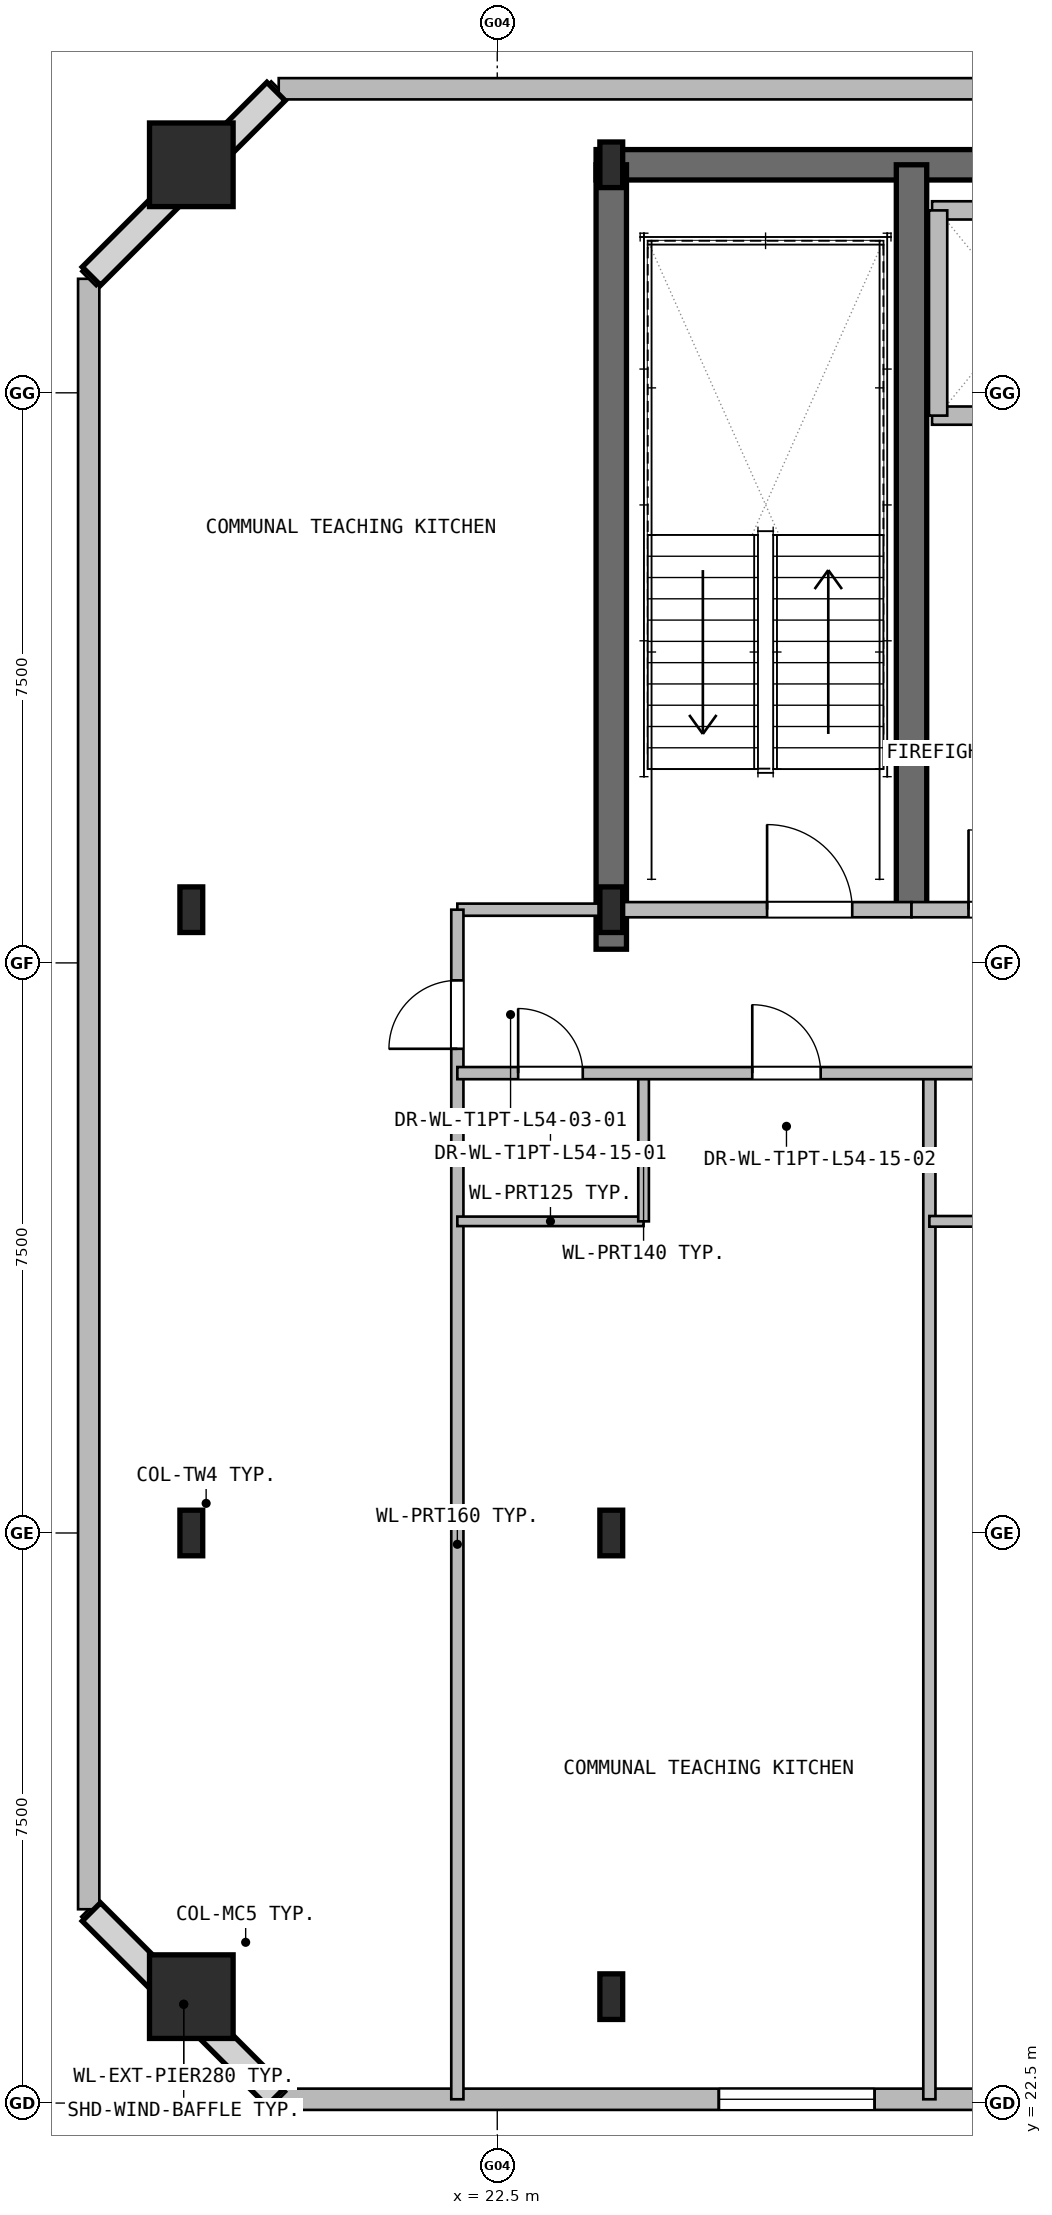
"""IFC4 building model, lengths in metres.
Left out: names, types, materials, properties, quantities, classifications, styles, units other than length and angle.
Written with IfcOpenShell. Run it as: python <this file> out.ifc"""

import sys

from ifc_helpers import new_model, si_unit, direction, frame, frame_2d, origin, origin_2d, place, context, subcontext, project, spatial, rectangle, hollow_rectangle, i_section, extrude, element, fill, save


model = new_model("IFC4")
c1 = context("Model", 3, precision=1e-05, world=origin(), true_north=direction((0.0, 1.0)))
c2 = subcontext(c1, "Body", "Model", "MODEL_VIEW")
j1 = project(units=[si_unit("LENGTHUNIT", "METRE"), si_unit("PLANEANGLEUNIT", "RADIAN")], contexts=[c1])
p1 = place(None, origin())
s1 = spatial("IfcSite", under=j1, at=p1, CompositionType="ELEMENT")
p2 = place(p1, origin())
s2 = spatial("IfcBuilding", under=s1, at=p2, CompositionType="ELEMENT")
p3 = place(p2, frame((0.0, 0.0, 197.1)))
s3 = spatial("IfcBuildingStorey", under=s2, at=p3, CompositionType="ELEMENT", Elevation=197.1)
p4 = place(p3, frame((23.8, 48.0, 0.0), z_axis=(0.0, 0.0, 1.0), x_axis=(1.0, 0.0, 0.0)))
e1 = element("IfcWall", 1, at=p4, inside=s3, PredefinedType="SHEAR", context=c2, shape_type="SweptSolid", body=[
    extrude(rectangle(XDim=27.4, YDim=0.4, at=frame_2d((13.7, 0.0))), origin(), (0.0, 0.0, 1.0), 4.2),
])
p5 = place(p3, frame((24.0, 37.68, 0.0), z_axis=(0.0, 0.0, 1.0), x_axis=(0.0, 1.0, 0.0)))
e2 = element("IfcWall", 2, at=p5, inside=s3, PredefinedType="SHEAR", context=c2, shape_type="SweptSolid", body=[
    extrude(rectangle(XDim=10.32, YDim=0.4, at=frame_2d((5.16, 0.0))), origin(), (0.0, 0.0, 1.0), 4.2),
])
p6 = place(p3, frame((27.95, 38.2, 0.0), z_axis=(0.0, 0.0, 1.0), x_axis=(0.0, 1.0, 0.0)))
e3 = element("IfcWall", 3, at=p6, inside=s3, PredefinedType="SHEAR", context=c2, shape_type="SweptSolid", body=[
    extrude(rectangle(XDim=9.8, YDim=0.4, at=frame_2d((4.9, 0.0))), origin(), (0.0, 0.0, 1.0), 4.2),
])
p7 = place(p3, frame((18.475, 23.9, 0.0), z_axis=(0.0, 0.0, 1.0), x_axis=(1.0, 0.0, 0.0)))
e4 = element("IfcColumn", 4, at=p7, inside=s3, PredefinedType="COLUMN", context=c2, shape_type="SweptSolid", body=[
    extrude(hollow_rectangle(XDim=1.1, YDim=1.1, WallThickness=0.032, at=origin_2d()), origin(), (0.0, 0.0, 1.0), 4.2),
])
for number, where, z_axis, x_axis in (
    (5, (18.475, 30.0, 0.0), (0.0, 0.0, 1.0), (1.0, 0.0, 0.0)),
    (6, (18.475, 38.2, 0.0), (0.0, 0.0, 1.0), (1.0, 0.0, 0.0)),
):
    element("IfcColumn", number, at=place(p3, frame(where, z_axis=z_axis, x_axis=x_axis)), inside=s3, PredefinedType="COLUMN", context=c2, shape_type="SweptSolid", body=[
        extrude(i_section(OverallWidth=0.3, OverallDepth=0.6, WebThickness=0.014, FlangeThickness=0.025, at=origin_2d()), origin(), (0.0, 0.0, 1.0), 4.2),
    ])
p8 = place(p3, frame((18.475, 48.0, 0.0), z_axis=(0.0, 0.0, 1.0), x_axis=(1.0, 0.0, 0.0)))
e7 = element("IfcColumn", 7, at=p8, inside=s3, PredefinedType="COLUMN", context=c2, shape_type="SweptSolid", body=[
    extrude(hollow_rectangle(XDim=1.1, YDim=1.1, WallThickness=0.032, at=origin_2d()), origin(), (0.0, 0.0, 1.0), 4.2),
])
for number, where, z_axis, x_axis in (
    (8, (24.0, 23.9, 0.0), (0.0, 0.0, 1.0), (1.0, 0.0, 0.0)),
    (9, (24.0, 30.0, 0.0), (0.0, 0.0, 1.0), (1.0, 0.0, 0.0)),
    (10, (24.0, 38.2, 0.0), (0.0, 0.0, 1.0), (1.0, 0.0, 0.0)),
    (11, (24.0, 48.0, 0.0), (0.0, 0.0, 1.0), (1.0, 0.0, 0.0)),
):
    element("IfcColumn", number, at=place(p3, frame(where, z_axis=z_axis, x_axis=x_axis)), inside=s3, PredefinedType="COLUMN", context=c2, shape_type="SweptSolid", body=[
        extrude(i_section(OverallWidth=0.3, OverallDepth=0.6, WebThickness=0.014, FlangeThickness=0.025, at=origin_2d()), origin(), (0.0, 0.0, 1.0), 4.2),
    ])
p9 = place(p3, frame((55.375, 22.55, 0.0), z_axis=(0.0, 0.0, 1.0), x_axis=(-1.0, 0.0, 0.0)))
e12 = element("IfcWall", 12, at=p9, inside=s3, PredefinedType="SOLIDWALL", context=c2, shape_type="SweptSolid", body=[
    extrude(rectangle(XDim=35.75, YDim=0.28, at=frame_2d((17.875, 0.0))), origin(), (0.0, 0.0, 1.0), 3.88),
])
p10 = place(p9, frame((27.91, 0.0, 0.8)))
e13 = element("IfcOpeningElement", 13, at=p10, cuts=e12, PredefinedType="OPENING", context=c2, shape_type="SweptSolid", body=[
    extrude(rectangle(XDim=2.05, YDim=1.9, at=frame_2d((1.025, 0.95))), frame((0.0, 0.15, 0.0), z_axis=(0.0, -1.0, 0.0), x_axis=(1.0, 0.0, 0.0)), (0.0, 0.0, 1.0), 0.3),
])
p11 = place(p9, frame((23.06, 0.0, 0.8)))
e14 = element("IfcOpeningElement", 14, at=p11, cuts=e12, PredefinedType="OPENING", context=c2, shape_type="SweptSolid", body=[
    extrude(rectangle(XDim=2.05, YDim=1.9, at=frame_2d((1.025, 0.95))), frame((0.0, 0.15, 0.0), z_axis=(0.0, -1.0, 0.0), x_axis=(1.0, 0.0, 0.0)), (0.0, 0.0, 1.0), 0.3),
])
p12 = place(p9, frame((16.85, 0.0, 0.8)))
e15 = element("IfcOpeningElement", 15, at=p12, cuts=e12, PredefinedType="OPENING", context=c2, shape_type="SweptSolid", body=[
    extrude(rectangle(XDim=2.05, YDim=1.9, at=frame_2d((1.025, 0.95))), frame((0.0, 0.15, 0.0), z_axis=(0.0, -1.0, 0.0), x_axis=(1.0, 0.0, 0.0)), (0.0, 0.0, 1.0), 0.3),
])
p13 = place(p9, frame((10.64, 0.0, 0.8)))
e16 = element("IfcOpeningElement", 16, at=p13, cuts=e12, PredefinedType="OPENING", context=c2, shape_type="SweptSolid", body=[
    extrude(rectangle(XDim=2.05, YDim=1.9, at=frame_2d((1.025, 0.95))), frame((0.0, 0.15, 0.0), z_axis=(0.0, -1.0, 0.0), x_axis=(1.0, 0.0, 0.0)), (0.0, 0.0, 1.0), 0.3),
])
p14 = place(p9, frame((5.79, 0.0, 0.8)))
e17 = element("IfcOpeningElement", 17, at=p14, cuts=e12, PredefinedType="OPENING", context=c2, shape_type="SweptSolid", body=[
    extrude(rectangle(XDim=2.05, YDim=1.9, at=frame_2d((1.025, 0.95))), frame((0.0, 0.15, 0.0), z_axis=(0.0, -1.0, 0.0), x_axis=(1.0, 0.0, 0.0)), (0.0, 0.0, 1.0), 0.3),
])
p15 = place(p3, frame((19.625, 22.55, 0.0), z_axis=(0.0, 0.0, 1.0), x_axis=(-0.707106781187, 0.707106781187, 0.0)))
e18 = element("IfcWall", 18, at=p15, inside=s3, PredefinedType="SOLIDWALL", context=c2, shape_type="SweptSolid", body=[
    extrude(rectangle(XDim=3.536, YDim=0.28, at=frame_2d((1.768, 0.0))), origin(), (0.0, 0.0, 1.0), 3.88),
])
p16 = place(p3, frame((17.125, 25.05, 0.0), z_axis=(0.0, 0.0, 1.0), x_axis=(0.0, 1.0, 0.0)))
e19 = element("IfcWall", 19, at=p16, inside=s3, PredefinedType="SOLIDWALL", context=c2, shape_type="SweptSolid", body=[
    extrude(rectangle(XDim=21.45, YDim=0.28, at=frame_2d((10.725, 0.0))), origin(), (0.0, 0.0, 1.0), 3.88),
])
p17 = place(p3, frame((17.125, 46.5, 0.0), z_axis=(0.0, 0.0, 1.0), x_axis=(0.707106781187, 0.707106781187, 0.0)))
e20 = element("IfcWall", 20, at=p17, inside=s3, PredefinedType="SOLIDWALL", context=c2, shape_type="SweptSolid", body=[
    extrude(rectangle(XDim=3.536, YDim=0.28, at=frame_2d((1.768, 0.0))), origin(), (0.0, 0.0, 1.0), 3.88),
])
p18 = place(p3, frame((19.625, 49.0, 0.0), z_axis=(0.0, 0.0, 1.0), x_axis=(1.0, 0.0, 0.0)))
e21 = element("IfcWall", 21, at=p18, inside=s3, PredefinedType="SOLIDWALL", context=c2, shape_type="SweptSolid", body=[
    extrude(rectangle(XDim=35.75, YDim=0.28, at=frame_2d((17.875, 0.0))), origin(), (0.0, 0.0, 1.0), 3.88),
])
p19 = place(p3, frame((24.0, 38.2, 0.0), z_axis=(0.0, 0.0, 1.0), x_axis=(1.0, 0.0, 0.0)))
e22 = element("IfcWall", 22, at=p19, inside=s3, PredefinedType="PARTITIONING", context=c2, shape_type="SweptSolid", body=[
    extrude(rectangle(XDim=3.95, YDim=0.2, at=frame_2d((1.975, 0.0))), origin(), (0.0, 0.0, 1.0), 3.28),
])
p20 = place(p19, frame((2.05, 0.0, 0.0)))
e23 = element("IfcOpeningElement", 23, at=p20, cuts=e22, PredefinedType="OPENING", context=c2, shape_type="SweptSolid", body=[
    extrude(rectangle(XDim=1.12, YDim=2.1, at=frame_2d((0.56, 1.05))), frame((0.0, 0.11, 0.0), z_axis=(0.0, -1.0, 0.0), x_axis=(1.0, 0.0, 0.0)), (0.0, 0.0, 1.0), 0.22),
])
p21 = place(p3, frame((27.95, 38.2, 0.0), z_axis=(0.0, 0.0, 1.0), x_axis=(1.0, 0.0, 0.0)))
e24 = element("IfcWall", 24, at=p21, inside=s3, PredefinedType="PARTITIONING", context=c2, shape_type="SweptSolid", body=[
    extrude(rectangle(XDim=2.85, YDim=0.2, at=frame_2d((1.425, 0.0))), origin(), (0.0, 0.0, 1.0), 3.28),
])
p22 = place(p21, frame((0.75, 0.0, 0.0)))
e25 = element("IfcOpeningElement", 25, at=p22, cuts=e24, PredefinedType="OPENING", context=c2, shape_type="SweptSolid", body=[
    extrude(rectangle(XDim=1.05, YDim=2.1, at=frame_2d((0.525, 1.05))), frame((0.0, 0.11, 0.0), z_axis=(0.0, -1.0, 0.0), x_axis=(1.0, 0.0, 0.0)), (0.0, 0.0, 1.0), 0.22),
])
p23 = place(p3, frame((28.22, 44.7, 0.0), z_axis=(0.0, 0.0, 1.0), x_axis=(1.0, 0.0, 0.0)))
e26 = element("IfcWall", 26, at=p23, inside=s3, PredefinedType="PARTITIONING", context=c2, shape_type="SweptSolid", body=[
    extrude(rectangle(XDim=2.36, YDim=0.24, at=frame_2d((1.18, 0.0))), origin(), (0.0, 0.0, 1.0), 3.58),
])
p24 = place(p23, frame((0.705, 0.0, 0.0)))
e27 = element("IfcOpeningElement", 27, at=p24, cuts=e26, PredefinedType="OPENING", context=c2, shape_type="SweptSolid", body=[
    extrude(rectangle(XDim=0.95, YDim=2.15, at=frame_2d((0.475, 1.075))), frame((0.0, 0.13, 0.0), z_axis=(0.0, -1.0, 0.0), x_axis=(1.0, 0.0, 0.0)), (0.0, 0.0, 1.0), 0.26),
])
p25 = place(p3, frame((28.22, 47.4, 0.0), z_axis=(0.0, 0.0, 1.0), x_axis=(1.0, 0.0, 0.0)))
e28 = element("IfcWall", 28, at=p25, inside=s3, PredefinedType="PARTITIONING", context=c2, shape_type="SweptSolid", body=[
    extrude(rectangle(XDim=2.36, YDim=0.24, at=frame_2d((1.18, 0.0))), origin(), (0.0, 0.0, 1.0), 3.88),
])
p26 = place(p3, frame((28.3, 44.7, 0.0), z_axis=(0.0, 0.0, 1.0), x_axis=(0.0, 1.0, 0.0)))
e29 = element("IfcWall", 29, at=p26, inside=s3, PredefinedType="PARTITIONING", context=c2, shape_type="SweptSolid", body=[
    extrude(rectangle(XDim=2.7, YDim=0.24, at=frame_2d((1.35, 0.0))), origin(), (0.0, 0.0, 1.0), 3.88),
])
p27 = place(p3, frame((21.975, 38.2, 0.0), z_axis=(0.0, 0.0, 1.0), x_axis=(1.0, 0.0, 0.0)))
e30 = element("IfcWall", 30, at=p27, inside=s3, PredefinedType="PARTITIONING", context=c2, shape_type="SweptSolid", body=[
    extrude(rectangle(XDim=2.025, YDim=0.16, at=frame_2d((1.012, 0.0))), origin(), (0.0, 0.0, 1.0), 3.28),
])
p28 = place(p3, frame((21.975, 22.55, 0.0), z_axis=(0.0, 0.0, 1.0), x_axis=(0.0, 1.0, 0.0)))
e31 = element("IfcWall", 31, at=p28, inside=s3, PredefinedType="PARTITIONING", context=c2, shape_type="SweptSolid", body=[
    extrude(rectangle(XDim=15.65, YDim=0.16, at=frame_2d((7.825, 0.0))), origin(), (0.0, 0.0, 1.0), 3.88),
])
p29 = place(p28, frame((13.82, 0.0, 0.0)))
e32 = element("IfcOpeningElement", 32, at=p29, cuts=e31, PredefinedType="OPENING", context=c2, shape_type="SweptSolid", body=[
    extrude(rectangle(XDim=0.9, YDim=2.05, at=frame_2d((0.45, 1.025))), frame((0.0, 0.09, 0.0), z_axis=(0.0, -1.0, 0.0), x_axis=(1.0, 0.0, 0.0)), (0.0, 0.0, 1.0), 0.18),
])
p30 = place(p3, frame((21.975, 34.1, 0.0), z_axis=(0.0, 0.0, 1.0), x_axis=(1.0, 0.0, 0.0)))
e33 = element("IfcWall", 33, at=p30, inside=s3, PredefinedType="PARTITIONING", context=c2, shape_type="SweptSolid", body=[
    extrude(rectangle(XDim=2.45, YDim=0.125, at=frame_2d((1.225, 0.0))), origin(), (0.0, 0.0, 1.0), 3.53),
])
p31 = place(p3, frame((24.425, 34.1, 0.0), z_axis=(0.0, 0.0, 1.0), x_axis=(0.0, 1.0, 0.0)))
e34 = element("IfcWall", 34, at=p31, inside=s3, PredefinedType="PARTITIONING", context=c2, shape_type="SweptSolid", body=[
    extrude(rectangle(XDim=1.95, YDim=0.14, at=frame_2d((0.975, 0.0))), origin(), (0.0, 0.0, 1.0), 3.88),
])
p32 = place(p3, frame((28.185, 22.55, 0.0), z_axis=(0.0, 0.0, 1.0), x_axis=(0.0, 1.0, 0.0)))
e35 = element("IfcWall", 35, at=p32, inside=s3, PredefinedType="PARTITIONING", context=c2, shape_type="SweptSolid", body=[
    extrude(rectangle(XDim=13.5, YDim=0.16, at=frame_2d((6.75, 0.0))), origin(), (0.0, 0.0, 1.0), 3.88),
])
p33 = place(p3, frame((28.185, 34.1, 0.0), z_axis=(0.0, 0.0, 1.0), x_axis=(1.0, 0.0, 0.0)))
e36 = element("IfcWall", 36, at=p33, inside=s3, PredefinedType="PARTITIONING", context=c2, shape_type="SweptSolid", body=[
    extrude(rectangle(XDim=4.43, YDim=0.14, at=frame_2d((2.215, 0.0))), origin(), (0.0, 0.0, 1.0), 3.53),
])
p34 = place(p3, frame((21.975, 36.05, 0.0), z_axis=(0.0, 0.0, 1.0), x_axis=(1.0, 0.0, 0.0)))
e37 = element("IfcWall", 37, at=p34, inside=s3, PredefinedType="PARTITIONING", context=c2, shape_type="SweptSolid", body=[
    extrude(rectangle(XDim=31.05, YDim=0.16, at=frame_2d((15.525, 0.0))), origin(), (0.0, 0.0, 1.0), 3.88),
])
p35 = place(p34, frame((0.8, 0.0, 0.0)))
e38 = element("IfcOpeningElement", 38, at=p35, cuts=e37, PredefinedType="OPENING", context=c2, shape_type="SweptSolid", body=[
    extrude(rectangle(XDim=0.85, YDim=2.05, at=frame_2d((0.425, 1.025))), frame((0.0, 0.09, 0.0), z_axis=(0.0, -1.0, 0.0), x_axis=(1.0, 0.0, 0.0)), (0.0, 0.0, 1.0), 0.18),
])
p36 = place(p34, frame((3.88, 0.0, 0.0)))
e39 = element("IfcOpeningElement", 39, at=p36, cuts=e37, PredefinedType="OPENING", context=c2, shape_type="SweptSolid", body=[
    extrude(rectangle(XDim=0.9, YDim=2.05, at=frame_2d((0.45, 1.025))), frame((0.0, 0.09, 0.0), z_axis=(0.0, -1.0, 0.0), x_axis=(1.0, 0.0, 0.0)), (0.0, 0.0, 1.0), 0.18),
])
p37 = place(p34, frame((8.0, 0.0, 0.0)))
e40 = element("IfcOpeningElement", 40, at=p37, cuts=e37, PredefinedType="OPENING", context=c2, shape_type="SweptSolid", body=[
    extrude(rectangle(XDim=0.85, YDim=2.05, at=frame_2d((0.425, 1.025))), frame((0.0, 0.09, 0.0), z_axis=(0.0, -1.0, 0.0), x_axis=(1.0, 0.0, 0.0)), (0.0, 0.0, 1.0), 0.18),
])
p38 = place(p34, frame((11.08, 0.0, 0.0)))
e41 = element("IfcOpeningElement", 41, at=p38, cuts=e37, PredefinedType="OPENING", context=c2, shape_type="SweptSolid", body=[
    extrude(rectangle(XDim=0.9, YDim=2.05, at=frame_2d((0.45, 1.025))), frame((0.0, 0.09, 0.0), z_axis=(0.0, -1.0, 0.0), x_axis=(1.0, 0.0, 0.0)), (0.0, 0.0, 1.0), 0.18),
])
p39 = place(p34, frame((15.05, 0.0, 0.0)))
e42 = element("IfcOpeningElement", 42, at=p39, cuts=e37, PredefinedType="OPENING", context=c2, shape_type="SweptSolid", body=[
    extrude(rectangle(XDim=0.95, YDim=2.1, at=frame_2d((0.475, 1.05))), frame((0.0, 0.09, 0.0), z_axis=(0.0, -1.0, 0.0), x_axis=(1.0, 0.0, 0.0)), (0.0, 0.0, 1.0), 0.18),
])
p40 = place(p34, frame((21.26, 0.0, 0.0)))
e43 = element("IfcOpeningElement", 43, at=p40, cuts=e37, PredefinedType="OPENING", context=c2, shape_type="SweptSolid", body=[
    extrude(rectangle(XDim=0.95, YDim=2.1, at=frame_2d((0.475, 1.05))), frame((0.0, 0.09, 0.0), z_axis=(0.0, -1.0, 0.0), x_axis=(1.0, 0.0, 0.0)), (0.0, 0.0, 1.0), 0.18),
])
p41 = place(p34, frame((28.41, 0.0, 0.0)))
e44 = element("IfcOpeningElement", 44, at=p41, cuts=e37, PredefinedType="OPENING", context=c2, shape_type="SweptSolid", body=[
    extrude(rectangle(XDim=0.85, YDim=2.05, at=frame_2d((0.425, 1.025))), frame((0.0, 0.09, 0.0), z_axis=(0.0, -1.0, 0.0), x_axis=(1.0, 0.0, 0.0)), (0.0, 0.0, 1.0), 0.18),
])
p42 = place(p34, frame((25.28, 0.0, 0.0)))
e45 = element("IfcOpeningElement", 45, at=p42, cuts=e37, PredefinedType="OPENING", context=c2, shape_type="SweptSolid", body=[
    extrude(rectangle(XDim=0.9, YDim=2.05, at=frame_2d((0.45, 1.025))), frame((0.0, 0.09, 0.0), z_axis=(0.0, -1.0, 0.0), x_axis=(1.0, 0.0, 0.0)), (0.0, 0.0, 1.0), 0.18),
])
p43 = place(p10, origin())
e46 = element("IfcWindow", 46, at=p43, inside=s3, PartitioningType="SINGLE_PANEL", PredefinedType="WINDOW", context=c2, shape_type="SweptSolid", body=[
    extrude(rectangle(XDim=2.05, YDim=1.9, at=frame_2d((1.025, 0.95))), frame((0.0, 0.03, 0.0), z_axis=(0.0, -1.0, 0.0), x_axis=(1.0, 0.0, 0.0)), (0.0, 0.0, 1.0), 0.06),
])
fill(e13, e46)
p44 = place(p20, origin())
e47 = element("IfcDoor", 47, at=p44, inside=s3, OperationType="SINGLE_SWING_LEFT", PredefinedType="DOOR", context=c2, shape_type="SweptSolid", body=[
    extrude(rectangle(XDim=1.12, YDim=2.1, at=frame_2d((0.56, 1.05))), frame((0.0, 0.025, 0.0), z_axis=(0.0, -1.0, 0.0), x_axis=(1.0, 0.0, 0.0)), (0.0, 0.0, 1.0), 0.05),
])
fill(e23, e47)
p45 = place(p22, origin())
e48 = element("IfcDoor", 48, at=p45, inside=s3, OperationType="SINGLE_SWING_RIGHT", PredefinedType="DOOR", context=c2, shape_type="SweptSolid", body=[
    extrude(rectangle(XDim=1.05, YDim=2.1, at=frame_2d((0.525, 1.05))), frame((0.0, 0.025, 0.0), z_axis=(0.0, -1.0, 0.0), x_axis=(1.0, 0.0, 0.0)), (0.0, 0.0, 1.0), 0.05),
])
fill(e25, e48)
p46 = place(p29, origin())
e49 = element("IfcDoor", 49, at=p46, inside=s3, OperationType="SINGLE_SWING_LEFT", PredefinedType="DOOR", context=c2, shape_type="SweptSolid", body=[
    extrude(rectangle(XDim=0.9, YDim=2.05, at=frame_2d((0.45, 1.025))), frame((0.0, 0.025, 0.0), z_axis=(0.0, -1.0, 0.0), x_axis=(1.0, 0.0, 0.0)), (0.0, 0.0, 1.0), 0.05),
])
fill(e32, e49)
p47 = place(p35, origin())
e50 = element("IfcDoor", 50, at=p47, inside=s3, OperationType="SINGLE_SWING_LEFT", PredefinedType="DOOR", context=c2, shape_type="SweptSolid", body=[
    extrude(rectangle(XDim=0.85, YDim=2.05, at=frame_2d((0.425, 1.025))), frame((0.0, 0.025, 0.0), z_axis=(0.0, -1.0, 0.0), x_axis=(1.0, 0.0, 0.0)), (0.0, 0.0, 1.0), 0.05),
])
fill(e38, e50)
p48 = place(p36, origin())
e51 = element("IfcDoor", 51, at=p48, inside=s3, OperationType="SINGLE_SWING_RIGHT", PredefinedType="DOOR", context=c2, shape_type="SweptSolid", body=[
    extrude(rectangle(XDim=0.9, YDim=2.05, at=frame_2d((0.45, 1.025))), frame((0.0, 0.025, 0.0), z_axis=(0.0, -1.0, 0.0), x_axis=(1.0, 0.0, 0.0)), (0.0, 0.0, 1.0), 0.05),
])
fill(e39, e51)
save(model, sys.argv[1])
